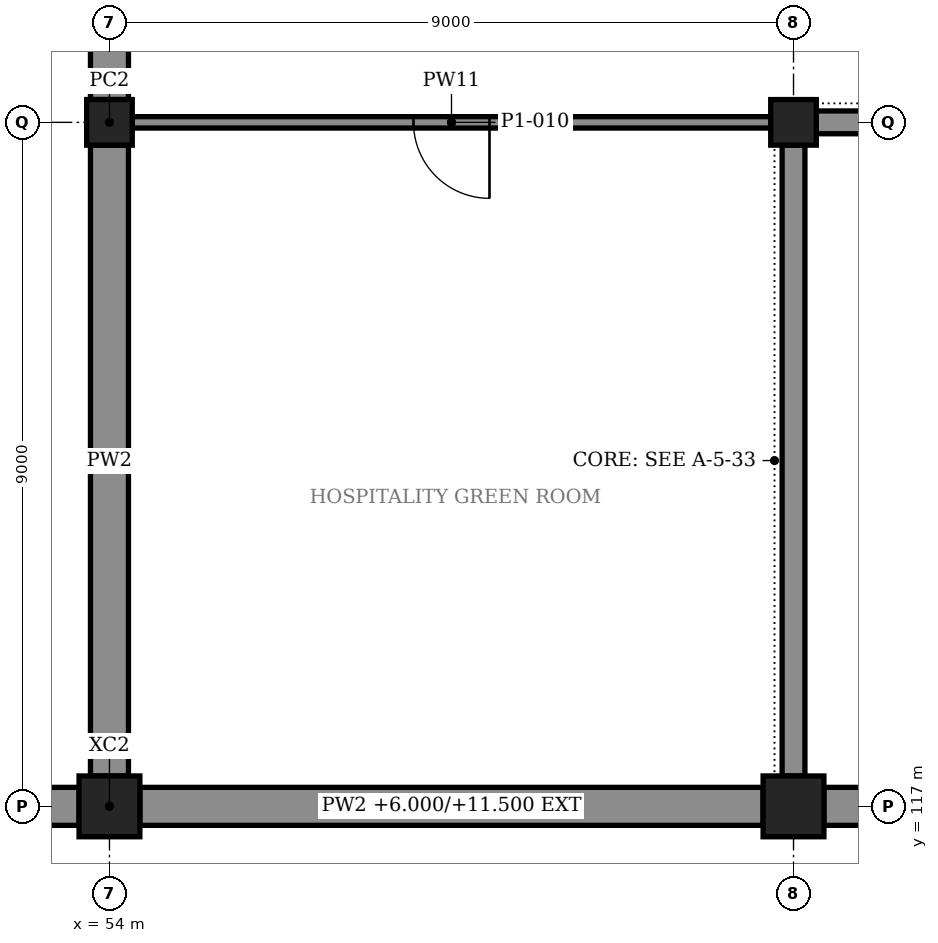
"""IFC4 building model, lengths in metres.
Left out: names, types, materials, properties, quantities, classifications, styles, units other than length and angle.
Written with IfcOpenShell. Run it as: python <this file> out.ifc"""

import sys

from ifc_helpers import new_model, si_unit, direction, frame, frame_2d, origin, origin_2d, place, context, subcontext, project, spatial, rectangle, extrude, element, fill, save


model = new_model("IFC4")
c1 = context("Model", 3, precision=1e-05, world=origin(), true_north=direction((0.0, 1.0)))
c2 = subcontext(c1, "Body", "Model", "MODEL_VIEW")
j1 = project(units=[si_unit("LENGTHUNIT", "METRE"), si_unit("PLANEANGLEUNIT", "RADIAN")], contexts=[c1])
p1 = place(None, origin())
s1 = spatial("IfcSite", under=j1, at=p1, CompositionType="ELEMENT")
p2 = place(p1, origin())
s2 = spatial("IfcBuilding", under=s1, at=p2, CompositionType="ELEMENT")
p3 = place(p2, frame((0.0, 0.0, 6.0)))
s3 = spatial("IfcBuildingStorey", under=s2, at=p3, CompositionType="ELEMENT", Elevation=6.0)
for number, where, z_axis, x_axis in (
    (1, (54.0, 117.0, 0.0), (0.0, 0.0, 1.0), (1.0, 0.0, 0.0)),
    (2, (63.0, 117.0, 0.0), (0.0, 0.0, 1.0), (1.0, 0.0, 0.0)),
):
    element("IfcColumn", number, at=place(p3, frame(where, z_axis=z_axis, x_axis=x_axis)), inside=s3, PredefinedType="COLUMN", context=c2, shape_type="SweptSolid", body=[
        extrude(rectangle(XDim=0.8, YDim=0.8, at=origin_2d()), origin(), (0.0, 0.0, 1.0), 5.5),
    ])
for number, where, z_axis, x_axis in (
    (3, (54.0, 126.0, 0.0), (0.0, 0.0, 1.0), (1.0, 0.0, 0.0)),
    (4, (63.0, 126.0, 0.0), (0.0, 0.0, 1.0), (1.0, 0.0, 0.0)),
):
    element("IfcColumn", number, at=place(p3, frame(where, z_axis=z_axis, x_axis=x_axis)), inside=s3, PredefinedType="COLUMN", context=c2, shape_type="SweptSolid", body=[
        extrude(rectangle(XDim=0.6, YDim=0.6, at=origin_2d()), origin(), (0.0, 0.0, 1.0), 5.5),
    ])
for number, where, z_axis, x_axis in (
    (5, (45.4, 117.0, 0.0), (0.0, 0.0, 1.0), (1.0, 0.0, 0.0)),
    (6, (54.4, 117.0, 0.0), (0.0, 0.0, 1.0), (1.0, 0.0, 0.0)),
    (7, (63.4, 117.0, 0.0), (0.0, 0.0, 1.0), (1.0, 0.0, 0.0)),
):
    element("IfcWall", number, at=place(p3, frame(where, z_axis=z_axis, x_axis=x_axis)), inside=s3, PredefinedType="SOLIDWALL", context=c2, shape_type="SweptSolid", body=[
        extrude(rectangle(XDim=8.2, YDim=0.5, at=frame_2d((4.1, 0.0))), origin(), (0.0, 0.0, 1.0), 5.5),
    ])
p4 = place(p3, frame((54.0, 117.4, 0.0), z_axis=(0.0, 0.0, 1.0), x_axis=(0.0, 1.0, 0.0)))
e8 = element("IfcWall", 8, at=p4, inside=s3, PredefinedType="SOLIDWALL", context=c2, shape_type="SweptSolid", body=[
    extrude(rectangle(XDim=8.3, YDim=0.5, at=frame_2d((4.15, 0.0))), origin(), (0.0, 0.0, 1.0), 4.32),
])
p5 = place(p3, frame((54.0, 126.3, 0.0), z_axis=(0.0, 0.0, 1.0), x_axis=(0.0, 1.0, 0.0)))
e9 = element("IfcWall", 9, at=p5, inside=s3, PredefinedType="SOLIDWALL", context=c2, shape_type="SweptSolid", body=[
    extrude(rectangle(XDim=8.45, YDim=0.5, at=frame_2d((4.225, 0.0))), origin(), (0.0, 0.0, 1.0), 4.32),
])
p6 = place(p3, frame((63.0, 117.4, 0.0), z_axis=(0.0, 0.0, 1.0), x_axis=(0.0, 1.0, 0.0)))
e10 = element("IfcWall", 10, at=p6, inside=s3, PredefinedType="SOLIDWALL", context=c2, shape_type="SweptSolid", body=[
    extrude(rectangle(XDim=8.3, YDim=0.3, at=frame_2d((4.15, 0.0))), origin(), (0.0, 0.0, 1.0), 4.32),
])
p7 = place(p3, frame((63.3, 126.0, 0.0), z_axis=(0.0, 0.0, 1.0), x_axis=(1.0, 0.0, 0.0)))
e11 = element("IfcWall", 11, at=p7, inside=s3, PredefinedType="SOLIDWALL", context=c2, shape_type="SweptSolid", body=[
    extrude(rectangle(XDim=8.3, YDim=0.3, at=frame_2d((4.15, 0.0))), origin(), (0.0, 0.0, 1.0), 4.32),
])
p8 = place(p7, frame((1.0, 0.0, 0.0)))
e12 = element("IfcOpeningElement", 12, at=p8, cuts=e11, PredefinedType="OPENING", context=c2, shape_type="SweptSolid", body=[
    extrude(rectangle(XDim=1.4, YDim=2.4, at=frame_2d((0.7, 1.2))), frame((0.0, 0.16, 0.0), z_axis=(0.0, -1.0, 0.0), x_axis=(1.0, 0.0, 0.0)), (0.0, 0.0, 1.0), 0.32),
])
p9 = place(p3, frame((62.7, 126.0, 0.0), z_axis=(0.0, 0.0, 1.0), x_axis=(-1.0, 0.0, 0.0)))
e13 = element("IfcWall", 13, at=p9, inside=s3, PredefinedType="PARTITIONING", context=c2, shape_type="SweptSolid", body=[
    extrude(rectangle(XDim=8.4, YDim=0.15, at=frame_2d((4.2, 0.0))), origin(), (0.0, 0.0, 1.0), 4.32),
])
p10 = place(p9, frame((3.7, 0.0, 0.0)))
e14 = element("IfcOpeningElement", 14, at=p10, cuts=e13, PredefinedType="OPENING", context=c2, shape_type="SweptSolid", body=[
    extrude(rectangle(XDim=1.0, YDim=2.4, at=frame_2d((0.5, 1.2))), frame((0.0, 0.085, 0.0), z_axis=(0.0, -1.0, 0.0), x_axis=(1.0, 0.0, 0.0)), (0.0, 0.0, 1.0), 0.17),
])
p11 = place(p10, origin())
e15 = element("IfcDoor", 15, at=p11, inside=s3, OperationType="SINGLE_SWING_LEFT", PredefinedType="DOOR", context=c2, shape_type="SweptSolid", body=[
    extrude(rectangle(XDim=1.0, YDim=2.4, at=frame_2d((0.5, 1.2))), frame((0.0, 0.025, 0.0), z_axis=(0.0, -1.0, 0.0), x_axis=(1.0, 0.0, 0.0)), (0.0, 0.0, 1.0), 0.05),
])
fill(e14, e15)
save(model, sys.argv[1])
